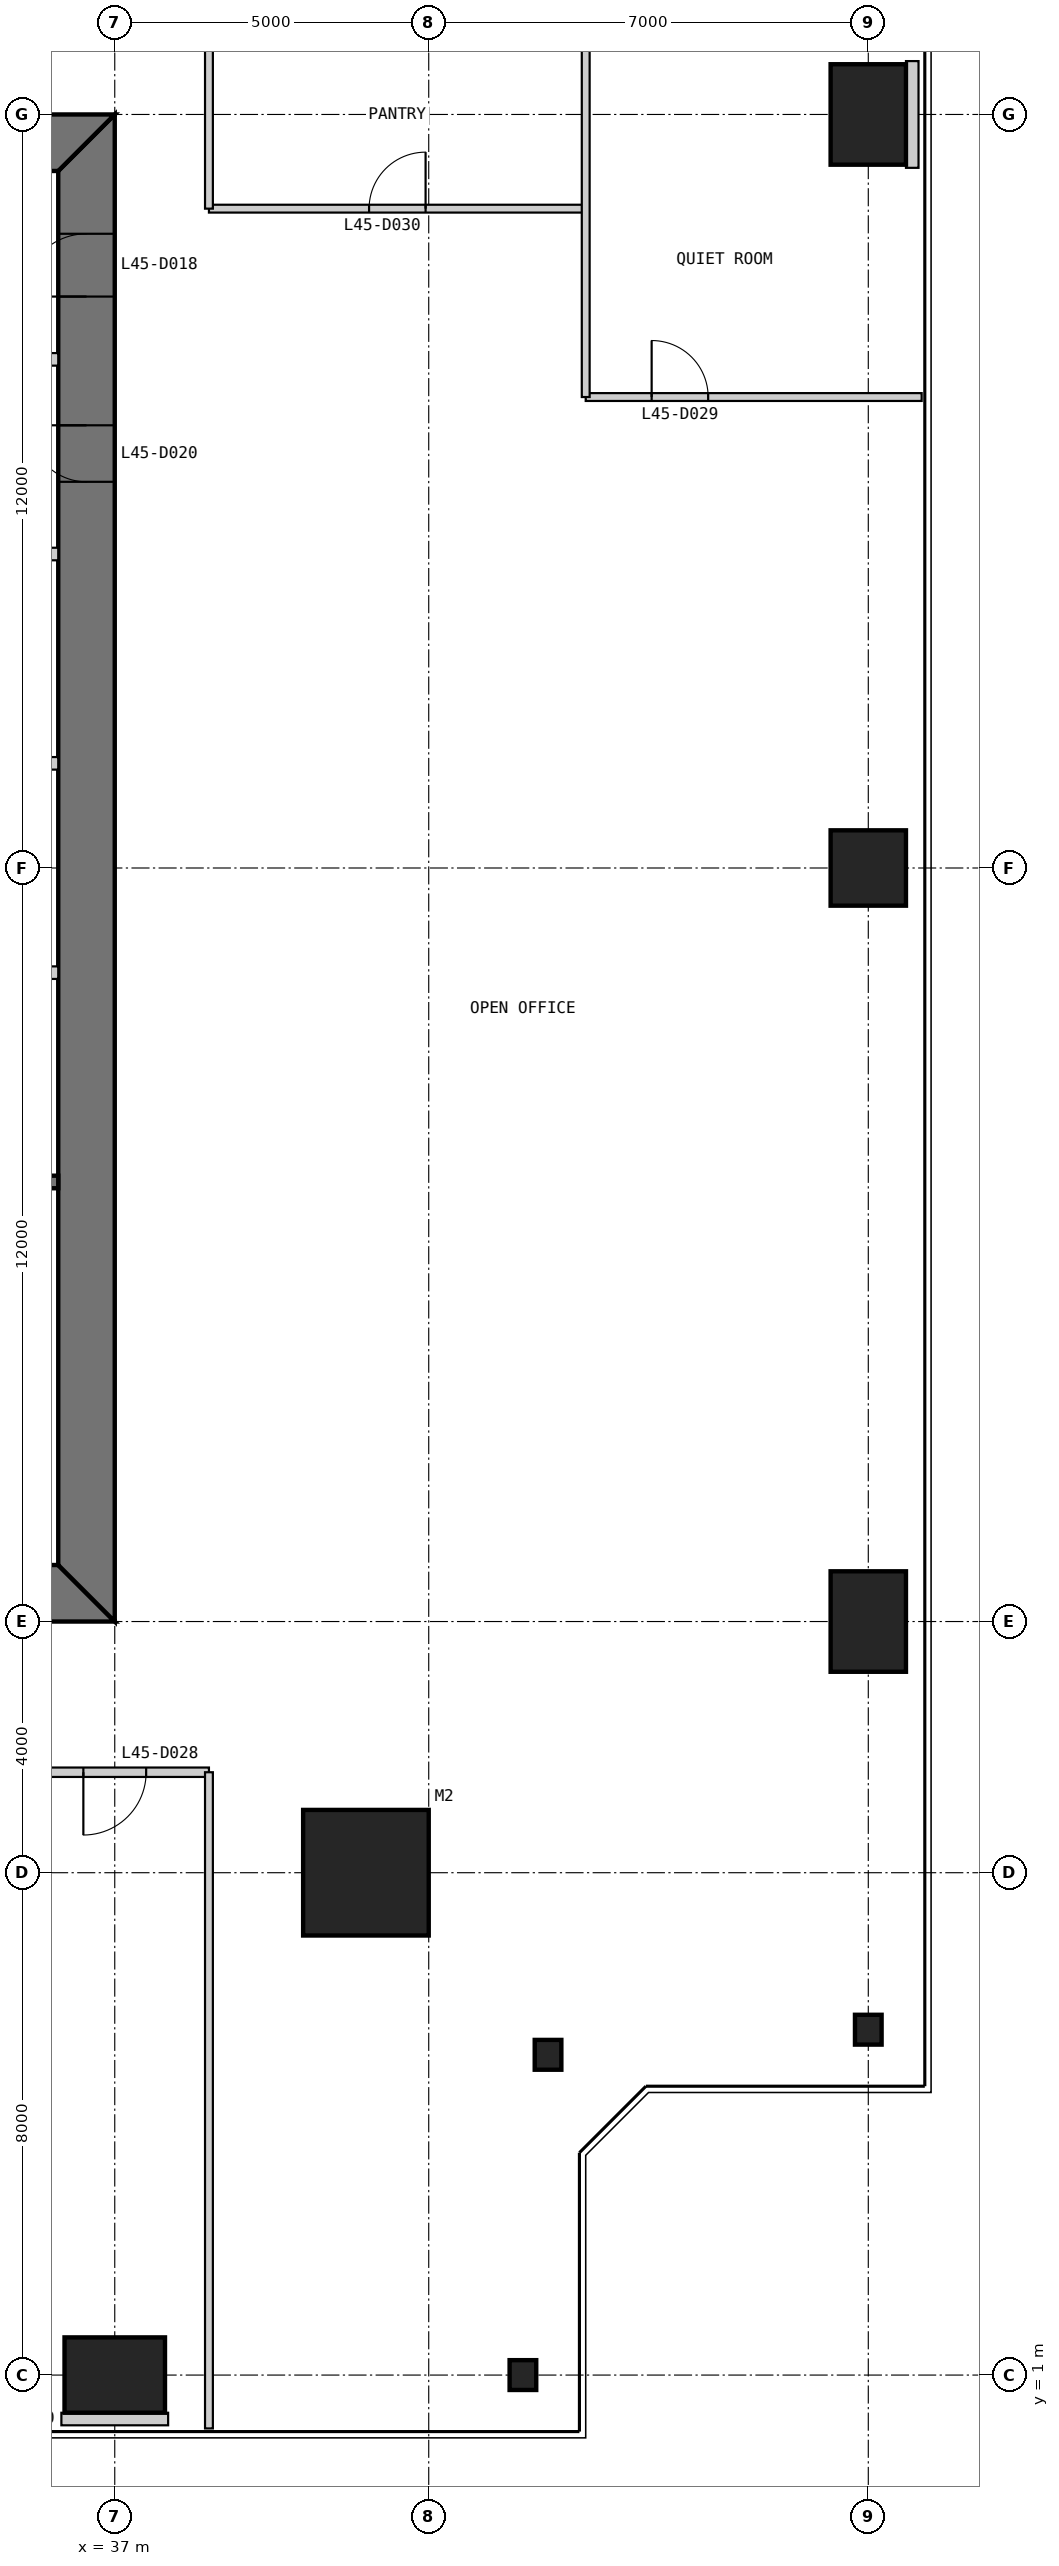
"""IFC4 building model, lengths in metres.
Left out: names, types, materials, properties, quantities, classifications, styles, units other than length and angle.
Written with IfcOpenShell. Run it as: python <this file> out.ifc"""

import sys

from ifc_helpers import new_model, si_unit, direction, frame, frame_2d, origin, origin_2d, place, context, subcontext, project, spatial, polyline, rectangle, i_section, outline, extrude, element, fill, save


model = new_model("IFC4")
c1 = context("Model", 3, precision=1e-05, world=origin(), true_north=direction((0.0, 1.0)))
c2 = subcontext(c1, "Body", "Model", "MODEL_VIEW")
j1 = project(units=[si_unit("LENGTHUNIT", "METRE"), si_unit("PLANEANGLEUNIT", "RADIAN")], contexts=[c1])
p1 = place(None, origin())
s1 = spatial("IfcSite", under=j1, at=p1, CompositionType="ELEMENT")
p2 = place(p1, origin())
s2 = spatial("IfcBuilding", under=s1, at=p2, CompositionType="ELEMENT")
p3 = place(p2, frame((0.0, 0.0, 193.8)))
s3 = spatial("IfcBuildingStorey", under=s2, at=p3, CompositionType="ELEMENT", Elevation=193.8)
p4 = place(p3, frame((41.0, 9.0, 0.0), z_axis=(0.0, 0.0, 1.0), x_axis=(1.0, 0.0, 0.0)))
e1 = element("IfcColumn", 1, at=p4, inside=s3, PredefinedType="COLUMN", context=c2, shape_type="SweptSolid", body=[
    extrude(rectangle(XDim=2.0, YDim=2.0, at=origin_2d()), origin(), (0.0, 0.0, 1.0), 4.0),
])
p5 = place(p3, frame((37.0, 1.0, 0.0), z_axis=(0.0, 0.0, 1.0), x_axis=(1.0, 0.0, 0.0)))
e2 = element("IfcColumn", 2, at=p5, inside=s3, PredefinedType="COLUMN", context=c2, shape_type="SweptSolid", body=[
    extrude(rectangle(XDim=1.6, YDim=1.2, at=origin_2d()), origin(), (0.0, 0.0, 1.0), 4.0),
])
for number, where, z_axis, x_axis in (
    (3, (43.5, 1.0, 0.0), (0.0, 0.0, 1.0), (1.0, 0.0, 0.0)),
    (4, (43.9, 6.1, 0.0), (0.0, 0.0, 1.0), (1.0, 0.0, 0.0)),
    (5, (49.0, 6.5, 0.0), (0.0, 0.0, 1.0), (1.0, 0.0, 0.0)),
):
    element("IfcColumn", number, at=place(p3, frame(where, z_axis=z_axis, x_axis=x_axis)), inside=s3, PredefinedType="COLUMN", context=c2, shape_type="SweptSolid", body=[
        extrude(i_section(OverallWidth=0.424, OverallDepth=0.475, WebThickness=0.048, FlangeThickness=0.077, at=origin_2d()), origin(), (0.0, 0.0, 1.0), 4.0),
    ])
p6 = place(p3, frame((49.0, 13.0, 0.0), z_axis=(0.0, 0.0, 1.0), x_axis=(1.0, 0.0, 0.0)))
e6 = element("IfcColumn", 6, at=p6, inside=s3, PredefinedType="COLUMN", context=c2, shape_type="SweptSolid", body=[
    extrude(rectangle(XDim=1.2, YDim=1.6, at=origin_2d()), origin(), (0.0, 0.0, 1.0), 4.0),
])
p7 = place(p3, frame((49.0, 25.0, 0.0), z_axis=(0.0, 0.0, 1.0), x_axis=(1.0, 0.0, 0.0)))
e7 = element("IfcColumn", 7, at=p7, inside=s3, PredefinedType="COLUMN", context=c2, shape_type="SweptSolid", body=[
    extrude(rectangle(XDim=1.2, YDim=1.2, at=origin_2d()), origin(), (0.0, 0.0, 1.0), 4.0),
])
p8 = place(p3, frame((49.0, 37.0, 0.0), z_axis=(0.0, 0.0, 1.0), x_axis=(1.0, 0.0, 0.0)))
e8 = element("IfcColumn", 8, at=p8, inside=s3, PredefinedType="COLUMN", context=c2, shape_type="SweptSolid", body=[
    extrude(rectangle(XDim=1.2, YDim=1.6, at=origin_2d()), origin(), (0.0, 0.0, 1.0), 4.0),
])
p9 = place(p3, frame((13.0, 13.45, 0.0), z_axis=(0.0, 0.0, 1.0), x_axis=(1.0, 0.0, 0.0)))
e9 = element("IfcWall", 9, at=p9, inside=s3, PredefinedType="SHEAR", context=c2, shape_type="SweptSolid", body=[
    extrude(outline(polyline([(0.0, -0.45), (24.0, -0.45), (23.1, 0.45), (0.9, 0.45), (0.0, -0.45)])), origin(), (0.0, 0.0, 1.0), 4.0),
])
p10 = place(p9, frame((4.9, 0.0, 0.0)))
e10 = element("IfcOpeningElement", 10, at=p10, cuts=e9, PredefinedType="OPENING", context=c2, shape_type="SweptSolid", body=[
    extrude(rectangle(XDim=1.0, YDim=2.2, at=frame_2d((0.5, 1.1))), frame((0.0, 0.46, 0.0), z_axis=(0.0, -1.0, 0.0), x_axis=(1.0, 0.0, 0.0)), (0.0, 0.0, 1.0), 0.92),
])
p11 = place(p9, frame((8.9, 0.0, 0.0)))
e11 = element("IfcOpeningElement", 11, at=p11, cuts=e9, PredefinedType="OPENING", context=c2, shape_type="SweptSolid", body=[
    extrude(rectangle(XDim=1.1, YDim=2.2, at=frame_2d((0.55, 1.1))), frame((0.0, 0.46, 0.0), z_axis=(0.0, -1.0, 0.0), x_axis=(1.0, 0.0, 0.0)), (0.0, 0.0, 1.0), 0.92),
])
p12 = place(p9, frame((15.05, 0.0, 0.0)))
e12 = element("IfcOpeningElement", 12, at=p12, cuts=e9, PredefinedType="OPENING", context=c2, shape_type="SweptSolid", body=[
    extrude(rectangle(XDim=0.9, YDim=2.2, at=frame_2d((0.45, 1.1))), frame((0.0, 0.46, 0.0), z_axis=(0.0, -1.0, 0.0), x_axis=(1.0, 0.0, 0.0)), (0.0, 0.0, 1.0), 0.92),
])
p13 = place(p9, frame((17.9, 0.0, 0.0)))
e13 = element("IfcOpeningElement", 13, at=p13, cuts=e9, PredefinedType="OPENING", context=c2, shape_type="SweptSolid", body=[
    extrude(rectangle(XDim=1.0, YDim=2.2, at=frame_2d((0.5, 1.1))), frame((0.0, 0.46, 0.0), z_axis=(0.0, -1.0, 0.0), x_axis=(1.0, 0.0, 0.0)), (0.0, 0.0, 1.0), 0.92),
])
p14 = place(p9, frame((21.4, 0.0, 0.0)))
e14 = element("IfcOpeningElement", 14, at=p14, cuts=e9, PredefinedType="OPENING", context=c2, shape_type="SweptSolid", body=[
    extrude(rectangle(XDim=1.0, YDim=2.2, at=frame_2d((0.5, 1.1))), frame((0.0, 0.46, 0.0), z_axis=(0.0, -1.0, 0.0), x_axis=(1.0, 0.0, 0.0)), (0.0, 0.0, 1.0), 0.92),
])
p15 = place(p3, frame((36.55, 13.9, 0.0), z_axis=(0.0, 0.0, 1.0), x_axis=(0.0, 1.0, 0.0)))
e15 = element("IfcWall", 15, at=p15, inside=s3, PredefinedType="SHEAR", context=c2, shape_type="SweptSolid", body=[
    extrude(outline(polyline([(-0.9, -0.45), (23.1, -0.45), (22.2, 0.45), (0.0, 0.45), (-0.9, -0.45)])), origin(), (0.0, 0.0, 1.0), 4.0),
])
p16 = place(p15, frame((20.2, 0.0, 0.0)))
e16 = element("IfcOpeningElement", 16, at=p16, cuts=e15, PredefinedType="OPENING", context=c2, shape_type="SweptSolid", body=[
    extrude(rectangle(XDim=1.0, YDim=2.2, at=frame_2d((0.5, 1.1))), frame((0.0, 0.46, 0.0), z_axis=(0.0, -1.0, 0.0), x_axis=(1.0, 0.0, 0.0)), (0.0, 0.0, 1.0), 0.92),
])
p17 = place(p15, frame((17.25, 0.0, 0.0)))
e17 = element("IfcOpeningElement", 17, at=p17, cuts=e15, PredefinedType="OPENING", context=c2, shape_type="SweptSolid", body=[
    extrude(rectangle(XDim=0.9, YDim=2.2, at=frame_2d((0.45, 1.1))), frame((0.0, 0.46, 0.0), z_axis=(0.0, -1.0, 0.0), x_axis=(1.0, 0.0, 0.0)), (0.0, 0.0, 1.0), 0.92),
])
p18 = place(p3, frame((37.0, 36.55, 0.0), z_axis=(0.0, 0.0, 1.0), x_axis=(-1.0, 0.0, 0.0)))
e18 = element("IfcWall", 18, at=p18, inside=s3, PredefinedType="SHEAR", context=c2, shape_type="SweptSolid", body=[
    extrude(outline(polyline([(0.0, -0.45), (24.0, -0.45), (23.1, 0.45), (0.9, 0.45), (0.0, -0.45)])), origin(), (0.0, 0.0, 1.0), 4.0),
])
p19 = place(p18, frame((4.9, 0.0, 0.0)))
e19 = element("IfcOpeningElement", 19, at=p19, cuts=e18, PredefinedType="OPENING", context=c2, shape_type="SweptSolid", body=[
    extrude(rectangle(XDim=1.0, YDim=2.2, at=frame_2d((0.5, 1.1))), frame((0.0, 0.46, 0.0), z_axis=(0.0, -1.0, 0.0), x_axis=(1.0, 0.0, 0.0)), (0.0, 0.0, 1.0), 0.92),
])
p20 = place(p18, frame((8.9, 0.0, 0.0)))
e20 = element("IfcOpeningElement", 20, at=p20, cuts=e18, PredefinedType="OPENING", context=c2, shape_type="SweptSolid", body=[
    extrude(rectangle(XDim=1.1, YDim=2.2, at=frame_2d((0.55, 1.1))), frame((0.0, 0.46, 0.0), z_axis=(0.0, -1.0, 0.0), x_axis=(1.0, 0.0, 0.0)), (0.0, 0.0, 1.0), 0.92),
])
p21 = place(p18, frame((15.05, 0.0, 0.0)))
e21 = element("IfcOpeningElement", 21, at=p21, cuts=e18, PredefinedType="OPENING", context=c2, shape_type="SweptSolid", body=[
    extrude(rectangle(XDim=0.9, YDim=2.2, at=frame_2d((0.45, 1.1))), frame((0.0, 0.46, 0.0), z_axis=(0.0, -1.0, 0.0), x_axis=(1.0, 0.0, 0.0)), (0.0, 0.0, 1.0), 0.92),
])
p22 = place(p18, frame((17.9, 0.0, 0.0)))
e22 = element("IfcOpeningElement", 22, at=p22, cuts=e18, PredefinedType="OPENING", context=c2, shape_type="SweptSolid", body=[
    extrude(rectangle(XDim=1.0, YDim=2.2, at=frame_2d((0.5, 1.1))), frame((0.0, 0.46, 0.0), z_axis=(0.0, -1.0, 0.0), x_axis=(1.0, 0.0, 0.0)), (0.0, 0.0, 1.0), 0.92),
])
p23 = place(p18, frame((21.4, 0.0, 0.0)))
e23 = element("IfcOpeningElement", 23, at=p23, cuts=e18, PredefinedType="OPENING", context=c2, shape_type="SweptSolid", body=[
    extrude(rectangle(XDim=1.0, YDim=2.2, at=frame_2d((0.5, 1.1))), frame((0.0, 0.46, 0.0), z_axis=(0.0, -1.0, 0.0), x_axis=(1.0, 0.0, 0.0)), (0.0, 0.0, 1.0), 0.92),
])
p24 = place(p3, frame((20.3, 20.0, 0.0), z_axis=(0.0, 0.0, 1.0), x_axis=(1.0, 0.0, 0.0)))
e24 = element("IfcWall", 24, at=p24, inside=s3, PredefinedType="SOLIDWALL", context=c2, shape_type="SweptSolid", body=[
    extrude(rectangle(XDim=15.8, YDim=0.2, at=frame_2d((7.9, 0.0))), origin(), (0.0, 0.0, 1.0), 3.8),
])
for number, where, z_axis, x_axis in (
    (25, (36.1, 30.0, 0.0), (0.0, 0.0, 1.0), (-1.0, 0.0, 0.0)),
    (26, (36.1, 26.667, 0.0), (0.0, 0.0, 1.0), (-1.0, 0.0, 0.0)),
    (27, (36.1, 23.333, 0.0), (0.0, 0.0, 1.0), (-1.0, 0.0, 0.0)),
    (28, (36.1, 33.1, 0.0), (0.0, 0.0, 1.0), (-1.0, 0.0, 0.0)),
):
    element("IfcWall", number, at=place(p3, frame(where, z_axis=z_axis, x_axis=x_axis)), inside=s3, PredefinedType="PARTITIONING", context=c2, shape_type="SweptSolid", body=[
        extrude(rectangle(XDim=2.8, YDim=0.2, at=frame_2d((1.4, 0.0))), origin(), (0.0, 0.0, 1.0), 3.8),
    ])
p25 = place(p3, frame((11.5, 10.6, 0.0), z_axis=(0.0, 0.0, 1.0), x_axis=(1.0, 0.0, 0.0)))
e29 = element("IfcWall", 29, at=p25, inside=s3, PredefinedType="PARTITIONING", context=c2, shape_type="SweptSolid", body=[
    extrude(rectangle(XDim=27.0, YDim=0.15, at=frame_2d((13.5, 0.0))), origin(), (0.0, 0.0, 1.0), 3.85),
])
p26 = place(p25, frame((12.25, 0.0, 0.0)))
e30 = element("IfcOpeningElement", 30, at=p26, cuts=e29, PredefinedType="OPENING", context=c2, shape_type="SweptSolid", body=[
    extrude(rectangle(XDim=1.0, YDim=2.2, at=frame_2d((0.5, 1.1))), frame((0.0, 0.085, 0.0), z_axis=(0.0, -1.0, 0.0), x_axis=(1.0, 0.0, 0.0)), (0.0, 0.0, 1.0), 0.17),
])
p27 = place(p25, frame((19.75, 0.0, 0.0)))
e31 = element("IfcOpeningElement", 31, at=p27, cuts=e29, PredefinedType="OPENING", context=c2, shape_type="SweptSolid", body=[
    extrude(rectangle(XDim=1.0, YDim=2.2, at=frame_2d((0.5, 1.1))), frame((0.0, 0.085, 0.0), z_axis=(0.0, -1.0, 0.0), x_axis=(1.0, 0.0, 0.0)), (0.0, 0.0, 1.0), 0.17),
])
p28 = place(p25, frame((0.25, 0.0, 0.0)))
e32 = element("IfcOpeningElement", 32, at=p28, cuts=e29, PredefinedType="OPENING", context=c2, shape_type="SweptSolid", body=[
    extrude(rectangle(XDim=1.0, YDim=2.2, at=frame_2d((0.5, 1.1))), frame((0.0, 0.085, 0.0), z_axis=(0.0, -1.0, 0.0), x_axis=(1.0, 0.0, 0.0)), (0.0, 0.0, 1.0), 0.17),
])
p29 = place(p25, frame((10.75, 0.0, 0.0)))
e33 = element("IfcOpeningElement", 33, at=p29, cuts=e29, PredefinedType="OPENING", context=c2, shape_type="SweptSolid", body=[
    extrude(rectangle(XDim=1.0, YDim=2.2, at=frame_2d((0.5, 1.1))), frame((0.0, 0.085, 0.0), z_axis=(0.0, -1.0, 0.0), x_axis=(1.0, 0.0, 0.0)), (0.0, 0.0, 1.0), 0.17),
])
p30 = place(p25, frame((22.0, 0.0, 0.0)))
e34 = element("IfcOpeningElement", 34, at=p30, cuts=e29, PredefinedType="OPENING", context=c2, shape_type="SweptSolid", body=[
    extrude(rectangle(XDim=1.0, YDim=2.2, at=frame_2d((0.5, 1.1))), frame((0.0, 0.085, 0.0), z_axis=(0.0, -1.0, 0.0), x_axis=(1.0, 0.0, 0.0)), (0.0, 0.0, 1.0), 0.17),
])
p31 = place(p25, frame((25.0, 0.0, 0.0)))
e35 = element("IfcOpeningElement", 35, at=p31, cuts=e29, PredefinedType="OPENING", context=c2, shape_type="SweptSolid", body=[
    extrude(rectangle(XDim=1.0, YDim=2.2, at=frame_2d((0.5, 1.1))), frame((0.0, 0.085, 0.0), z_axis=(0.0, -1.0, 0.0), x_axis=(1.0, 0.0, 0.0)), (0.0, 0.0, 1.0), 0.17),
])
p32 = place(p3, frame((38.5, 0.15, 0.0), z_axis=(0.0, 0.0, 1.0), x_axis=(0.0, 1.0, 0.0)))
e36 = element("IfcWall", 36, at=p32, inside=s3, PredefinedType="PARTITIONING", context=c2, shape_type="SweptSolid", body=[
    extrude(rectangle(XDim=10.45, YDim=0.125, at=frame_2d((5.225, 0.0))), origin(), (0.0, 0.0, 1.0), 3.85),
])
p33 = place(p3, frame((49.85, 32.5, 0.0), z_axis=(0.0, 0.0, 1.0), x_axis=(-1.0, 0.0, 0.0)))
e37 = element("IfcWall", 37, at=p33, inside=s3, PredefinedType="PARTITIONING", context=c2, shape_type="SweptSolid", body=[
    extrude(rectangle(XDim=5.35, YDim=0.125, at=frame_2d((2.675, 0.0))), origin(), (0.0, 0.0, 1.0), 3.85),
])
p34 = place(p33, frame((3.4, 0.0, 0.0)))
e38 = element("IfcOpeningElement", 38, at=p34, cuts=e37, PredefinedType="OPENING", context=c2, shape_type="SweptSolid", body=[
    extrude(rectangle(XDim=0.9, YDim=2.2, at=frame_2d((0.45, 1.1))), frame((0.0, 0.073, 0.0), z_axis=(0.0, -1.0, 0.0), x_axis=(1.0, 0.0, 0.0)), (0.0, 0.0, 1.0), 0.145),
])
p35 = place(p3, frame((44.5, 35.5, 0.0), z_axis=(0.0, 0.0, 1.0), x_axis=(-1.0, 0.0, 0.0)))
e39 = element("IfcWall", 39, at=p35, inside=s3, PredefinedType="PARTITIONING", context=c2, shape_type="SweptSolid", body=[
    extrude(rectangle(XDim=6.0, YDim=0.125, at=frame_2d((3.0, 0.0))), origin(), (0.0, 0.0, 1.0), 3.85),
])
p36 = place(p35, frame((2.55, 0.0, 0.0)))
e40 = element("IfcOpeningElement", 40, at=p36, cuts=e39, PredefinedType="OPENING", context=c2, shape_type="SweptSolid", body=[
    extrude(rectangle(XDim=0.9, YDim=2.2, at=frame_2d((0.45, 1.1))), frame((0.0, 0.073, 0.0), z_axis=(0.0, -1.0, 0.0), x_axis=(1.0, 0.0, 0.0)), (0.0, 0.0, 1.0), 0.145),
])
p37 = place(p3, frame((44.5, 32.5, 0.0), z_axis=(0.0, 0.0, 1.0), x_axis=(0.0, 1.0, 0.0)))
e41 = element("IfcWall", 41, at=p37, inside=s3, PredefinedType="PARTITIONING", context=c2, shape_type="SweptSolid", body=[
    extrude(rectangle(XDim=6.0, YDim=0.125, at=frame_2d((3.0, 0.0))), origin(), (0.0, 0.0, 1.0), 3.85),
])
p38 = place(p3, frame((38.5, 35.5, 0.0), z_axis=(0.0, 0.0, 1.0), x_axis=(0.0, 1.0, 0.0)))
e42 = element("IfcWall", 42, at=p38, inside=s3, PredefinedType="PARTITIONING", context=c2, shape_type="SweptSolid", body=[
    extrude(rectangle(XDim=3.0, YDim=0.125, at=frame_2d((1.5, 0.0))), origin(), (0.0, 0.0, 1.0), 3.85),
])
for number, where, z_axis, x_axis in (
    (43, (37.0, 0.2, 0.0), (0.0, 0.0, 1.0), (0.0, 1.0, 0.0)),
    (44, (49.8, 37.0, 0.0), (0.0, 0.0, 1.0), (-1.0, 0.0, 0.0)),
):
    element("IfcWall", number, at=place(p3, frame(where, z_axis=z_axis, x_axis=x_axis)), inside=s3, PredefinedType="PARTITIONING", context=c2, shape_type="SweptSolid", body=[
        extrude(rectangle(XDim=0.2, YDim=1.7, at=frame_2d((0.1, 0.0))), origin(), (0.0, 0.0, 1.0), 3.85),
    ])
p39 = place(p16, origin())
e45 = element("IfcDoor", 45, at=p39, inside=s3, OperationType="SINGLE_SWING_LEFT", PredefinedType="DOOR", context=c2, shape_type="SweptSolid", body=[
    extrude(rectangle(XDim=1.0, YDim=2.2, at=frame_2d((0.5, 1.1))), frame((0.0, 0.025, 0.0), z_axis=(0.0, -1.0, 0.0), x_axis=(1.0, 0.0, 0.0)), (0.0, 0.0, 1.0), 0.05),
    extrude(outline(polyline([(0.0, 0.0), (0.04, 0.0), (0.04, 2.16), (0.96, 2.16), (0.96, 0.0), (1.0, 0.0), (1.0, 2.2), (0.0, 2.2), (0.0, 0.0)])), frame((0.0, 0.3, 0.0), z_axis=(0.0, -1.0, 0.0), x_axis=(1.0, 0.0, 0.0)), (0.0, 0.0, 1.0), 0.6),
])
fill(e16, e45)
p40 = place(p17, origin())
e46 = element("IfcDoor", 46, at=p40, inside=s3, OperationType="SINGLE_SWING_RIGHT", PredefinedType="DOOR", context=c2, shape_type="SweptSolid", body=[
    extrude(rectangle(XDim=0.9, YDim=2.2, at=frame_2d((0.45, 1.1))), frame((0.0, 0.025, 0.0), z_axis=(0.0, -1.0, 0.0), x_axis=(1.0, 0.0, 0.0)), (0.0, 0.0, 1.0), 0.05),
    extrude(outline(polyline([(0.0, 0.0), (0.04, 0.0), (0.04, 2.16), (0.86, 2.16), (0.86, 0.0), (0.9, 0.0), (0.9, 2.2), (0.0, 2.2), (0.0, 0.0)])), frame((0.0, 0.3, 0.0), z_axis=(0.0, -1.0, 0.0), x_axis=(1.0, 0.0, 0.0)), (0.0, 0.0, 1.0), 0.6),
])
fill(e17, e46)
p41 = place(p31, frame((1.0, 0.0, 0.0), z_axis=(0.0, 0.0, 1.0), x_axis=(-1.0, 0.0, 0.0)))
e47 = element("IfcDoor", 47, at=p41, inside=s3, OperationType="SINGLE_SWING_RIGHT", PredefinedType="DOOR", context=c2, shape_type="SweptSolid", body=[
    extrude(rectangle(XDim=1.0, YDim=2.2, at=frame_2d((0.5, 1.1))), frame((0.0, 0.025, 0.0), z_axis=(0.0, -1.0, 0.0), x_axis=(1.0, 0.0, 0.0)), (0.0, 0.0, 1.0), 0.05),
])
fill(e35, e47)
p42 = place(p34, frame((0.9, 0.0, 0.0), z_axis=(0.0, 0.0, 1.0), x_axis=(-1.0, 0.0, 0.0)))
e48 = element("IfcDoor", 48, at=p42, inside=s3, OperationType="SINGLE_SWING_LEFT", PredefinedType="DOOR", context=c2, shape_type="SweptSolid", body=[
    extrude(rectangle(XDim=0.9, YDim=2.2, at=frame_2d((0.45, 1.1))), frame((0.0, 0.025, 0.0), z_axis=(0.0, -1.0, 0.0), x_axis=(1.0, 0.0, 0.0)), (0.0, 0.0, 1.0), 0.05),
])
fill(e38, e48)
p43 = place(p36, frame((0.9, 0.0, 0.0), z_axis=(0.0, 0.0, 1.0), x_axis=(-1.0, 0.0, 0.0)))
e49 = element("IfcDoor", 49, at=p43, inside=s3, OperationType="SINGLE_SWING_RIGHT", PredefinedType="DOOR", context=c2, shape_type="SweptSolid", body=[
    extrude(rectangle(XDim=0.9, YDim=2.2, at=frame_2d((0.45, 1.1))), frame((0.0, 0.025, 0.0), z_axis=(0.0, -1.0, 0.0), x_axis=(1.0, 0.0, 0.0)), (0.0, 0.0, 1.0), 0.05),
])
fill(e40, e49)
save(model, sys.argv[1])
